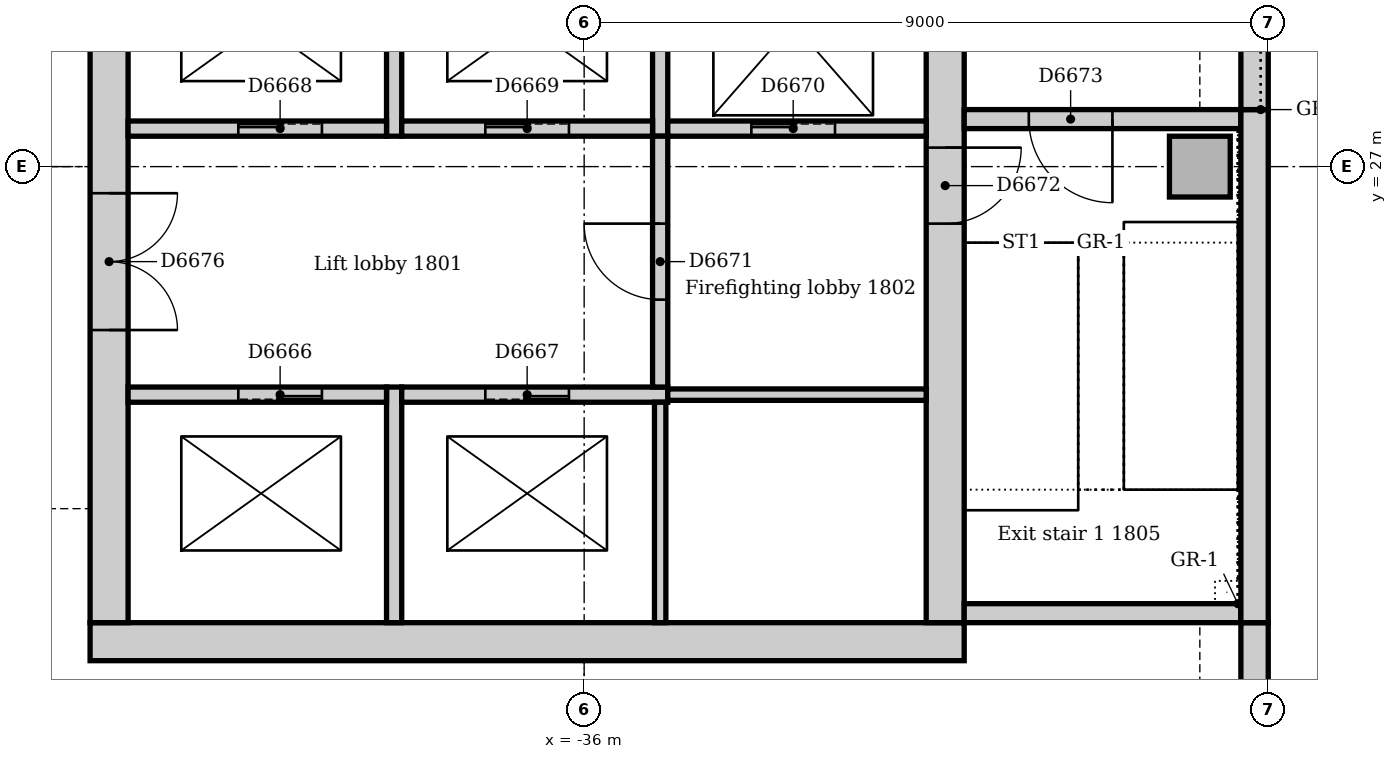
"""IFC4 building model, lengths in metres.
Left out: names, types, materials, properties, quantities, classifications, styles, units other than length and angle.
Written with IfcOpenShell. Run it as: python <this file> out.ifc"""

import sys

from ifc_helpers import new_model, si_unit, direction, frame, frame_2d, origin, origin_2d, place, context, subcontext, project, spatial, rectangle, extrude, element, fill, save


model = new_model("IFC4")
c1 = context("Model", 3, precision=1e-05, world=origin(), true_north=direction((0.0, 1.0)))
c2 = subcontext(c1, "Body", "Model", "MODEL_VIEW")
j1 = project(units=[si_unit("LENGTHUNIT", "METRE"), si_unit("PLANEANGLEUNIT", "RADIAN")], contexts=[c1])
p1 = place(None, origin())
s1 = spatial("IfcSite", under=j1, at=p1, CompositionType="ELEMENT")
p2 = place(p1, origin())
s2 = spatial("IfcBuilding", under=s1, at=p2, CompositionType="ELEMENT")
p3 = place(p2, frame((0.0, 0.0, 79.0)))
s3 = spatial("IfcBuildingStorey", under=s2, at=p3, CompositionType="ELEMENT", Elevation=79.0)
p4 = place(p3, frame((-42.5, 20.75, 0.0), z_axis=(0.0, 0.0, 1.0), x_axis=(1.0, 0.0, 0.0)))
e1 = element("IfcWall", 1, at=p4, inside=s3, PredefinedType="SOLIDWALL", context=c2, shape_type="SweptSolid", body=[
    extrude(rectangle(XDim=11.5, YDim=0.5, at=frame_2d((5.75, 0.0))), origin(), (0.0, 0.0, 1.0), 4.0),
])
p5 = place(p3, frame((-31.25, 21.0, 0.0), z_axis=(0.0, 0.0, 1.0), x_axis=(0.0, 1.0, 0.0)))
e2 = element("IfcWall", 2, at=p5, inside=s3, PredefinedType="SOLIDWALL", context=c2, shape_type="SweptSolid", body=[
    extrude(rectangle(XDim=9.5, YDim=0.5, at=frame_2d((4.75, 0.0))), origin(), (0.0, 0.0, 1.0), 4.0),
])
p6 = place(p5, frame((5.25, 0.0, 0.0)))
e3 = element("IfcOpeningElement", 3, at=p6, cuts=e2, PredefinedType="OPENING", context=c2, shape_type="SweptSolid", body=[
    extrude(rectangle(XDim=1.0, YDim=2.1, at=frame_2d((0.5, 1.05))), frame((0.0, 0.26, 0.0), z_axis=(0.0, -1.0, 0.0), x_axis=(1.0, 0.0, 0.0)), (0.0, 0.0, 1.0), 0.52),
])
p7 = place(p3, frame((-42.25, 30.5, 0.0), z_axis=(0.0, 0.0, 1.0), x_axis=(0.0, -1.0, 0.0)))
e4 = element("IfcWall", 4, at=p7, inside=s3, PredefinedType="SOLIDWALL", context=c2, shape_type="SweptSolid", body=[
    extrude(rectangle(XDim=9.5, YDim=0.5, at=frame_2d((4.75, 0.0))), origin(), (0.0, 0.0, 1.0), 4.0),
])
p8 = place(p7, frame((3.85, 0.0, 0.0)))
e5 = element("IfcOpeningElement", 5, at=p8, cuts=e4, PredefinedType="OPENING", context=c2, shape_type="SweptSolid", body=[
    extrude(rectangle(XDim=1.8, YDim=2.1, at=frame_2d((0.9, 1.05))), frame((0.0, 0.26, 0.0), z_axis=(0.0, -1.0, 0.0), x_axis=(1.0, 0.0, 0.0)), (0.0, 0.0, 1.0), 0.52),
])
p9 = place(p3, frame((-31.0, 21.125, 0.0), z_axis=(0.0, 0.0, 1.0), x_axis=(1.0, 0.0, 0.0)))
e6 = element("IfcWall", 6, at=p9, inside=s3, PredefinedType="SOLIDWALL", context=c2, shape_type="SweptSolid", body=[
    extrude(rectangle(XDim=3.64, YDim=0.25, at=frame_2d((1.82, 0.0))), origin(), (0.0, 0.0, 1.0), 4.0),
])
p10 = place(p3, frame((-27.36, 27.625, 0.0), z_axis=(0.0, 0.0, 1.0), x_axis=(-1.0, 0.0, 0.0)))
e7 = element("IfcWall", 7, at=p10, inside=s3, PredefinedType="SOLIDWALL", context=c2, shape_type="SweptSolid", body=[
    extrude(rectangle(XDim=3.64, YDim=0.25, at=frame_2d((1.82, 0.0))), origin(), (0.0, 0.0, 1.0), 4.0),
])
p11 = place(p10, frame((1.69, 0.0, 0.0)))
e8 = element("IfcOpeningElement", 8, at=p11, cuts=e7, PredefinedType="OPENING", context=c2, shape_type="SweptSolid", body=[
    extrude(rectangle(XDim=1.1, YDim=2.1, at=frame_2d((0.55, 1.05))), frame((0.0, 0.135, 0.0), z_axis=(0.0, -1.0, 0.0), x_axis=(1.0, 0.0, 0.0)), (0.0, 0.0, 1.0), 0.27),
])
p12 = place(p3, frame((-27.9, 27.0, 0.0), z_axis=(0.0, 0.0, 1.0), x_axis=(1.0, 0.0, 0.0)))
e9 = element("IfcColumn", 9, at=p12, inside=s3, PredefinedType="COLUMN", context=c2, shape_type="SweptSolid", body=[
    extrude(rectangle(XDim=0.8, YDim=0.8, at=origin_2d()), origin(), (0.0, 0.0, 1.0), 4.0),
])
p13 = place(p3, frame((-27.18, 13.243, 0.0), z_axis=(0.0, 0.0, 1.0), x_axis=(0.0, 1.0, 0.0)))
e10 = element("IfcWall", 10, at=p13, inside=s3, PredefinedType="STANDARD", context=c2, shape_type="SweptSolid", body=[
    extrude(rectangle(XDim=7.757, YDim=0.36, at=frame_2d((3.879, 0.0))), origin(), (0.0, 0.0, 1.0), 3.85),
])
p14 = place(p13, frame((1.982, 0.0, 0.9)))
e11 = element("IfcOpeningElement", 11, at=p14, cuts=e10, PredefinedType="OPENING", context=c2, shape_type="SweptSolid", body=[
    extrude(rectangle(XDim=3.3, YDim=1.6, at=frame_2d((1.65, 0.8))), frame((0.0, 0.19, 0.0), z_axis=(0.0, -1.0, 0.0), x_axis=(1.0, 0.0, 0.0)), (0.0, 0.0, 1.0), 0.38),
])
p15 = place(p3, frame((-27.18, 21.0, 0.0), z_axis=(0.0, 0.0, 1.0), x_axis=(0.0, 1.0, 0.0)))
e12 = element("IfcWall", 12, at=p15, inside=s3, PredefinedType="STANDARD", context=c2, shape_type="SweptSolid", body=[
    extrude(rectangle(XDim=6.75, YDim=0.36, at=frame_2d((3.375, 0.0))), origin(), (0.0, 0.0, 1.0), 3.85),
])
p16 = place(p3, frame((-27.18, 27.75, 0.0), z_axis=(0.0, 0.0, 1.0), x_axis=(0.0, 1.0, 0.0)))
e13 = element("IfcWall", 13, at=p16, inside=s3, PredefinedType="STANDARD", context=c2, shape_type="SweptSolid", body=[
    extrude(rectangle(XDim=7.5, YDim=0.36, at=frame_2d((3.75, 0.0))), origin(), (0.0, 0.0, 1.0), 3.85),
])
p17 = place(p16, frame((2.85, 0.0, 1.2)))
e14 = element("IfcOpeningElement", 14, at=p17, cuts=e13, PredefinedType="OPENING", context=c2, shape_type="SweptSolid", body=[
    extrude(rectangle(XDim=1.8, YDim=1.2, at=frame_2d((0.9, 0.6))), frame((0.0, 0.19, 0.0), z_axis=(0.0, -1.0, 0.0), x_axis=(1.0, 0.0, 0.0)), (0.0, 0.0, 1.0), 0.38),
])
p18 = place(p3, frame((-38.5, 21.0, 0.0), z_axis=(0.0, 0.0, 1.0), x_axis=(0.0, 1.0, 0.0)))
e15 = element("IfcWall", 15, at=p18, inside=s3, PredefinedType="SOLIDWALL", context=c2, shape_type="SweptSolid", body=[
    extrude(rectangle(XDim=3.1, YDim=0.2, at=frame_2d((1.55, 0.0))), origin(), (0.0, 0.0, 1.0), 4.0),
])
p19 = place(p3, frame((-38.6, 24.0, 0.0), z_axis=(0.0, 0.0, 1.0), x_axis=(-1.0, 0.0, 0.0)))
e16 = element("IfcWall", 16, at=p19, inside=s3, PredefinedType="SOLIDWALL", context=c2, shape_type="SweptSolid", body=[
    extrude(rectangle(XDim=3.4, YDim=0.2, at=frame_2d((1.7, 0.0))), origin(), (0.0, 0.0, 1.0), 4.0),
])
p20 = place(p19, frame((0.85, 0.0, 0.0)))
e17 = element("IfcOpeningElement", 17, at=p20, cuts=e16, PredefinedType="OPENING", context=c2, shape_type="SweptSolid", body=[
    extrude(rectangle(XDim=1.1, YDim=2.1, at=frame_2d((0.55, 1.05))), frame((0.0, 0.11, 0.0), z_axis=(0.0, -1.0, 0.0), x_axis=(1.0, 0.0, 0.0)), (0.0, 0.0, 1.0), 0.22),
])
p21 = place(p3, frame((-34.9, 24.0, 0.0), z_axis=(0.0, 0.0, 1.0), x_axis=(-1.0, 0.0, 0.0)))
e18 = element("IfcWall", 18, at=p21, inside=s3, PredefinedType="SOLIDWALL", context=c2, shape_type="SweptSolid", body=[
    extrude(rectangle(XDim=3.5, YDim=0.2, at=frame_2d((1.75, 0.0))), origin(), (0.0, 0.0, 1.0), 4.0),
])
p22 = place(p21, frame((1.3, 0.0, 0.0)))
e19 = element("IfcOpeningElement", 19, at=p22, cuts=e18, PredefinedType="OPENING", context=c2, shape_type="SweptSolid", body=[
    extrude(rectangle(XDim=1.1, YDim=2.1, at=frame_2d((0.55, 1.05))), frame((0.0, 0.11, 0.0), z_axis=(0.0, -1.0, 0.0), x_axis=(1.0, 0.0, 0.0)), (0.0, 0.0, 1.0), 0.22),
])
p23 = place(p3, frame((-38.5, 27.4, 0.0), z_axis=(0.0, 0.0, 1.0), x_axis=(0.0, 1.0, 0.0)))
e20 = element("IfcWall", 20, at=p23, inside=s3, PredefinedType="SOLIDWALL", context=c2, shape_type="SweptSolid", body=[
    extrude(rectangle(XDim=2.85, YDim=0.2, at=frame_2d((1.425, 0.0))), origin(), (0.0, 0.0, 1.0), 4.0),
])
p24 = place(p3, frame((-42.0, 27.5, 0.0), z_axis=(0.0, 0.0, 1.0), x_axis=(1.0, 0.0, 0.0)))
e21 = element("IfcWall", 21, at=p24, inside=s3, PredefinedType="SOLIDWALL", context=c2, shape_type="SweptSolid", body=[
    extrude(rectangle(XDim=3.4, YDim=0.2, at=frame_2d((1.7, 0.0))), origin(), (0.0, 0.0, 1.0), 4.0),
])
p25 = place(p24, frame((1.45, 0.0, 0.0)))
e22 = element("IfcOpeningElement", 22, at=p25, cuts=e21, PredefinedType="OPENING", context=c2, shape_type="SweptSolid", body=[
    extrude(rectangle(XDim=1.1, YDim=2.1, at=frame_2d((0.55, 1.05))), frame((0.0, 0.11, 0.0), z_axis=(0.0, -1.0, 0.0), x_axis=(1.0, 0.0, 0.0)), (0.0, 0.0, 1.0), 0.22),
])
p26 = place(p3, frame((-35.0, 27.4, 0.0), z_axis=(0.0, 0.0, 1.0), x_axis=(0.0, 1.0, 0.0)))
e23 = element("IfcWall", 23, at=p26, inside=s3, PredefinedType="SOLIDWALL", context=c2, shape_type="SweptSolid", body=[
    extrude(rectangle(XDim=2.85, YDim=0.2, at=frame_2d((1.425, 0.0))), origin(), (0.0, 0.0, 1.0), 4.0),
])
p27 = place(p3, frame((-38.4, 27.5, 0.0), z_axis=(0.0, 0.0, 1.0), x_axis=(1.0, 0.0, 0.0)))
e24 = element("IfcWall", 24, at=p27, inside=s3, PredefinedType="SOLIDWALL", context=c2, shape_type="SweptSolid", body=[
    extrude(rectangle(XDim=3.3, YDim=0.2, at=frame_2d((1.65, 0.0))), origin(), (0.0, 0.0, 1.0), 4.0),
])
p28 = place(p27, frame((1.1, 0.0, 0.0)))
e25 = element("IfcOpeningElement", 25, at=p28, cuts=e24, PredefinedType="OPENING", context=c2, shape_type="SweptSolid", body=[
    extrude(rectangle(XDim=1.1, YDim=2.1, at=frame_2d((0.55, 1.05))), frame((0.0, 0.11, 0.0), z_axis=(0.0, -1.0, 0.0), x_axis=(1.0, 0.0, 0.0)), (0.0, 0.0, 1.0), 0.22),
])
p29 = place(p3, frame((-34.9, 27.5, 0.0), z_axis=(0.0, 0.0, 1.0), x_axis=(1.0, 0.0, 0.0)))
e26 = element("IfcWall", 26, at=p29, inside=s3, PredefinedType="SOLIDWALL", context=c2, shape_type="SweptSolid", body=[
    extrude(rectangle(XDim=3.4, YDim=0.2, at=frame_2d((1.7, 0.0))), origin(), (0.0, 0.0, 1.0), 4.0),
])
p30 = place(p29, frame((1.1, 0.0, 0.0)))
e27 = element("IfcOpeningElement", 27, at=p30, cuts=e26, PredefinedType="OPENING", context=c2, shape_type="SweptSolid", body=[
    extrude(rectangle(XDim=1.1, YDim=2.1, at=frame_2d((0.55, 1.05))), frame((0.0, 0.11, 0.0), z_axis=(0.0, -1.0, 0.0), x_axis=(1.0, 0.0, 0.0)), (0.0, 0.0, 1.0), 0.22),
])
p31 = place(p3, frame((-35.0, 24.1, 0.0), z_axis=(0.0, 0.0, 1.0), x_axis=(0.0, 1.0, 0.0)))
e28 = element("IfcWall", 28, at=p31, inside=s3, PredefinedType="SOLIDWALL", context=c2, shape_type="SweptSolid", body=[
    extrude(rectangle(XDim=3.3, YDim=0.2, at=frame_2d((1.65, 0.0))), origin(), (0.0, 0.0, 1.0), 4.0),
])
p32 = place(p31, frame((1.15, 0.0, 0.0)))
e29 = element("IfcOpeningElement", 29, at=p32, cuts=e28, PredefinedType="OPENING", context=c2, shape_type="SweptSolid", body=[
    extrude(rectangle(XDim=1.0, YDim=2.1, at=frame_2d((0.5, 1.05))), frame((0.0, 0.11, 0.0), z_axis=(0.0, -1.0, 0.0), x_axis=(1.0, 0.0, 0.0)), (0.0, 0.0, 1.0), 0.22),
])
p33 = place(p3, frame((-35.0, 21.0, 0.0), z_axis=(0.0, 0.0, 1.0), x_axis=(0.0, 1.0, 0.0)))
e30 = element("IfcWall", 30, at=p33, inside=s3, PredefinedType="SOLIDWALL", context=c2, shape_type="SweptSolid", body=[
    extrude(rectangle(XDim=2.9, YDim=0.15, at=frame_2d((1.45, 0.0))), origin(), (0.0, 0.0, 1.0), 4.0),
])
p34 = place(p3, frame((-31.5, 24.0, 0.0), z_axis=(0.0, 0.0, 1.0), x_axis=(-1.0, 0.0, 0.0)))
e31 = element("IfcWall", 31, at=p34, inside=s3, PredefinedType="SOLIDWALL", context=c2, shape_type="SweptSolid", body=[
    extrude(rectangle(XDim=3.4, YDim=0.15, at=frame_2d((1.7, 0.0))), origin(), (0.0, 0.0, 1.0), 4.0),
])
p35 = place(p20, origin())
e32 = element("IfcDoor", 32, at=p35, inside=s3, OperationType="SLIDING_TO_LEFT", PredefinedType="DOOR", context=c2, shape_type="SweptSolid", body=[
    extrude(rectangle(XDim=1.1, YDim=2.1, at=frame_2d((0.55, 1.05))), frame((0.0, 0.025, 0.0), z_axis=(0.0, -1.0, 0.0), x_axis=(1.0, 0.0, 0.0)), (0.0, 0.0, 1.0), 0.05),
])
fill(e17, e32)
p36 = place(p22, origin())
e33 = element("IfcDoor", 33, at=p36, inside=s3, OperationType="SLIDING_TO_LEFT", PredefinedType="DOOR", context=c2, shape_type="SweptSolid", body=[
    extrude(rectangle(XDim=1.1, YDim=2.1, at=frame_2d((0.55, 1.05))), frame((0.0, 0.025, 0.0), z_axis=(0.0, -1.0, 0.0), x_axis=(1.0, 0.0, 0.0)), (0.0, 0.0, 1.0), 0.05),
])
fill(e19, e33)
p37 = place(p25, origin())
e34 = element("IfcDoor", 34, at=p37, inside=s3, OperationType="SLIDING_TO_LEFT", PredefinedType="DOOR", context=c2, shape_type="SweptSolid", body=[
    extrude(rectangle(XDim=1.1, YDim=2.1, at=frame_2d((0.55, 1.05))), frame((0.0, 0.025, 0.0), z_axis=(0.0, -1.0, 0.0), x_axis=(1.0, 0.0, 0.0)), (0.0, 0.0, 1.0), 0.05),
])
fill(e22, e34)
p38 = place(p28, origin())
e35 = element("IfcDoor", 35, at=p38, inside=s3, OperationType="SLIDING_TO_LEFT", PredefinedType="DOOR", context=c2, shape_type="SweptSolid", body=[
    extrude(rectangle(XDim=1.1, YDim=2.1, at=frame_2d((0.55, 1.05))), frame((0.0, 0.025, 0.0), z_axis=(0.0, -1.0, 0.0), x_axis=(1.0, 0.0, 0.0)), (0.0, 0.0, 1.0), 0.05),
])
fill(e25, e35)
p39 = place(p30, origin())
e36 = element("IfcDoor", 36, at=p39, inside=s3, OperationType="SLIDING_TO_LEFT", PredefinedType="DOOR", context=c2, shape_type="SweptSolid", body=[
    extrude(rectangle(XDim=1.1, YDim=2.1, at=frame_2d((0.55, 1.05))), frame((0.0, 0.025, 0.0), z_axis=(0.0, -1.0, 0.0), x_axis=(1.0, 0.0, 0.0)), (0.0, 0.0, 1.0), 0.05),
])
fill(e27, e36)
p40 = place(p32, origin())
e37 = element("IfcDoor", 37, at=p40, inside=s3, OperationType="SINGLE_SWING_RIGHT", PredefinedType="DOOR", context=c2, shape_type="SweptSolid", body=[
    extrude(rectangle(XDim=1.0, YDim=2.1, at=frame_2d((0.5, 1.05))), frame((0.0, 0.025, 0.0), z_axis=(0.0, -1.0, 0.0), x_axis=(1.0, 0.0, 0.0)), (0.0, 0.0, 1.0), 0.05),
])
fill(e29, e37)
p41 = place(p6, frame((1.0, 0.0, 0.0), z_axis=(0.0, 0.0, 1.0), x_axis=(-1.0, 0.0, 0.0)))
e38 = element("IfcDoor", 38, at=p41, inside=s3, OperationType="SINGLE_SWING_LEFT", PredefinedType="DOOR", context=c2, shape_type="SweptSolid", body=[
    extrude(rectangle(XDim=1.0, YDim=2.1, at=frame_2d((0.5, 1.05))), frame((0.0, 0.025, 0.0), z_axis=(0.0, -1.0, 0.0), x_axis=(1.0, 0.0, 0.0)), (0.0, 0.0, 1.0), 0.05),
])
fill(e3, e38)
p42 = place(p11, origin())
e39 = element("IfcDoor", 39, at=p42, inside=s3, OperationType="SINGLE_SWING_LEFT", PredefinedType="DOOR", context=c2, shape_type="SweptSolid", body=[
    extrude(rectangle(XDim=1.1, YDim=2.1, at=frame_2d((0.55, 1.05))), frame((0.0, 0.025, 0.0), z_axis=(0.0, -1.0, 0.0), x_axis=(1.0, 0.0, 0.0)), (0.0, 0.0, 1.0), 0.05),
])
fill(e8, e39)
p43 = place(p8, origin())
e40 = element("IfcDoor", 40, at=p43, inside=s3, OperationType="DOUBLE_DOOR_SINGLE_SWING", PredefinedType="DOOR", context=c2, shape_type="SweptSolid", body=[
    extrude(rectangle(XDim=1.8, YDim=2.1, at=frame_2d((0.9, 1.05))), frame((0.0, 0.025, 0.0), z_axis=(0.0, -1.0, 0.0), x_axis=(1.0, 0.0, 0.0)), (0.0, 0.0, 1.0), 0.05),
])
fill(e5, e40)
save(model, sys.argv[1])
